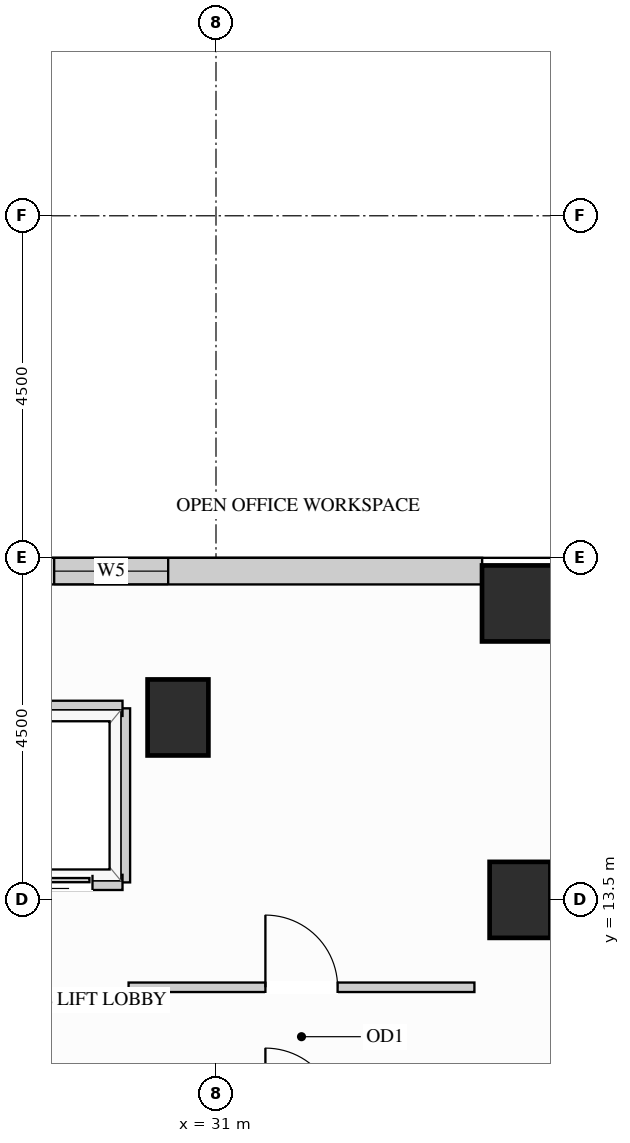
"""IFC4 building model, lengths in metres.
Left out: names, types, materials, properties, quantities, classifications, styles, units other than length and angle.
Written with IfcOpenShell. Run it as: python <this file> out.ifc"""

import sys

from ifc_helpers import new_model, si_unit, direction, frame, frame_2d, origin, origin_2d, place, context, subcontext, project, spatial, rectangle, extrude, source, transform, mapped, element, fill, save


model = new_model("IFC4")
c1 = context("Model", 3, precision=1e-05, world=origin(), true_north=direction((0.0, 1.0)))
c2 = subcontext(c1, "Body", "Model", "MODEL_VIEW")
j1 = project(units=[si_unit("LENGTHUNIT", "METRE"), si_unit("PLANEANGLEUNIT", "RADIAN")], contexts=[c1])
p1 = place(None, origin())
s1 = spatial("IfcSite", under=j1, at=p1, CompositionType="ELEMENT")
p2 = place(p1, origin())
s2 = spatial("IfcBuilding", under=s1, at=p2, CompositionType="ELEMENT")
p3 = place(p2, frame((0.0, 0.0, 189.9)))
s3 = spatial("IfcBuildingStorey", under=s2, at=p3, CompositionType="ELEMENT", Elevation=189.9)
m1 = source(origin(), c2, "Body", "SweptSolid", [
    extrude(rectangle(XDim=0.8, YDim=1.0, at=origin_2d()), origin(), (0.0, 0.0, 1.0), 3.4),
])
for number, where, z_axis, x_axis in (
    (1, (35.0, 13.5, 0.0), (0.0, 0.0, 1.0), (1.0, 0.0, 0.0)),
    (2, (30.5, 15.9, 0.0), (0.0, 0.0, 1.0), (1.0, 0.0, 0.0)),
):
    element("IfcColumn", number, at=place(p3, frame(where, z_axis=z_axis, x_axis=x_axis)), inside=s3, PredefinedType="COLUMN", context=c2, shape_type="MappedRepresentation", body=[
        mapped(m1, transform((0.0, 0.0, 0.0), x_axis=(1.0, 0.0, 0.0), y_axis=(0.0, 1.0, 0.0), z_axis=(0.0, 0.0, 1.0))),
    ])
m2 = source(origin(), c2, "Body", "SweptSolid", [
    extrude(rectangle(XDim=1.0, YDim=1.0, at=origin_2d()), origin(), (0.0, 0.0, 1.0), 3.4),
])
p4 = place(p3, frame((35.0, 17.4, 0.0), z_axis=(0.0, 0.0, 1.0), x_axis=(1.0, 0.0, 0.0)))
e3 = element("IfcColumn", 3, at=p4, inside=s3, PredefinedType="COLUMN", context=c2, shape_type="MappedRepresentation", body=[
    mapped(m2, transform((0.0, 0.0, 0.0), x_axis=(1.0, 0.0, 0.0), y_axis=(0.0, 1.0, 0.0), z_axis=(0.0, 0.0, 1.0))),
])
p5 = place(p3, frame((34.502, 17.825, 0.0), z_axis=(0.0, 0.0, 1.0), x_axis=(-1.0, 0.0, 0.0)))
e4 = element("IfcWall", 4, at=p5, inside=s3, PredefinedType="SOLIDWALL", context=c2, shape_type="SweptSolid", body=[
    extrude(rectangle(XDim=15.104, YDim=0.35, at=frame_2d((7.552, 0.0))), origin(), (0.0, 0.0, 1.0), 3.385),
])
p6 = place(p5, frame((4.131, 0.0, 0.78)))
e5 = element("IfcOpeningElement", 5, at=p6, cuts=e4, PredefinedType="OPENING", context=c2, shape_type="SweptSolid", body=[
    extrude(rectangle(XDim=1.5, YDim=2.0, at=frame_2d((0.75, 1.0))), frame((0.0, 0.185, 0.0), z_axis=(0.0, -1.0, 0.0), x_axis=(1.0, 0.0, 0.0)), (0.0, 0.0, 1.0), 0.37),
])
p7 = place(p5, frame((9.442, 0.0, 0.78)))
e6 = element("IfcOpeningElement", 6, at=p7, cuts=e4, PredefinedType="OPENING", context=c2, shape_type="SweptSolid", body=[
    extrude(rectangle(XDim=1.5, YDim=2.0, at=frame_2d((0.75, 1.0))), frame((0.0, 0.185, 0.0), z_axis=(0.0, -1.0, 0.0), x_axis=(1.0, 0.0, 0.0)), (0.0, 0.0, 1.0), 0.37),
])
p8 = place(p3, frame((29.85, 12.35, 0.0), z_axis=(0.0, 0.0, 1.0), x_axis=(1.0, 0.0, 0.0)))
e7 = element("IfcWall", 7, at=p8, inside=s3, PredefinedType="PARTITIONING", context=c2, shape_type="SweptSolid", body=[
    extrude(rectangle(XDim=4.55, YDim=0.125, at=frame_2d((2.275, 0.0))), origin(), (0.0, 0.0, 1.0), 3.385),
])
p9 = place(p8, frame((1.8, 0.0, 0.0)))
e8 = element("IfcOpeningElement", 8, at=p9, cuts=e7, PredefinedType="OPENING", context=c2, shape_type="SweptSolid", body=[
    extrude(rectangle(XDim=0.95, YDim=2.15, at=frame_2d((0.475, 1.075))), frame((0.0, 0.073, 0.0), z_axis=(0.0, -1.0, 0.0), x_axis=(1.0, 0.0, 0.0)), (0.0, 0.0, 1.0), 0.145),
])
m3 = source(origin(), c2, "Body", "SweptSolid", [
    extrude(rectangle(XDim=2.29, YDim=0.2, at=frame_2d((1.145, 0.0))), origin(), (0.0, 0.0, 1.0), 3.385),
])
p10 = place(p3, frame((29.77, 13.73, 0.0), z_axis=(0.0, 0.0, 1.0), x_axis=(0.0, 1.0, 0.0)))
e9 = element("IfcWall", 9, at=p10, inside=s3, PredefinedType="PARTITIONING", context=c2, shape_type="MappedRepresentation", body=[
    mapped(m3, transform((0.0, 0.0, 0.0), x_axis=(1.0, 0.0, 0.0), y_axis=(0.0, 1.0, 0.0), z_axis=(0.0, 0.0, 1.0))),
])
m4 = source(origin(), c2, "Body", "SweptSolid", [
    extrude(rectangle(XDim=1.89, YDim=0.2, at=frame_2d((0.945, 0.0))), origin(), (0.0, 0.0, 1.0), 2.773),
])
p11 = place(p3, frame((27.88, 16.02, 0.0), z_axis=(0.0, 0.0, 1.0), x_axis=(1.0, 0.0, 0.0)))
e10 = element("IfcWall", 10, at=p11, inside=s3, PredefinedType="PARTITIONING", context=c2, shape_type="MappedRepresentation", body=[
    mapped(m4, transform((0.0, 0.0, 0.0), x_axis=(1.0, 0.0, 0.0), y_axis=(0.0, 1.0, 0.0), z_axis=(0.0, 0.0, 1.0))),
])
p12 = place(p3, frame((27.88, 13.73, 0.0), z_axis=(0.0, 0.0, 1.0), x_axis=(1.0, 0.0, 0.0)))
e11 = element("IfcWall", 11, at=p12, inside=s3, PredefinedType="PARTITIONING", context=c2, shape_type="SweptSolid", body=[
    extrude(rectangle(XDim=1.89, YDim=0.2, at=frame_2d((0.945, 0.0))), origin(), (0.0, 0.0, 1.0), 2.466),
])
p13 = place(p12, frame((0.395, 0.0, 0.0)))
e12 = element("IfcOpeningElement", 12, at=p13, cuts=e11, PredefinedType="OPENING", context=c2, shape_type="SweptSolid", body=[
    extrude(rectangle(XDim=1.1, YDim=2.2, at=frame_2d((0.55, 1.1))), frame((0.0, 0.11, 0.0), z_axis=(0.0, -1.0, 0.0), x_axis=(1.0, 0.0, 0.0)), (0.0, 0.0, 1.0), 0.22),
])
m5 = source(origin(), c2, "Body", "SweptSolid", [
    extrude(rectangle(XDim=1.1, YDim=2.2, at=frame_2d((0.55, 1.1))), frame((0.0, 0.025, 0.0), z_axis=(0.0, -1.0, 0.0), x_axis=(1.0, 0.0, 0.0)), (0.0, 0.0, 1.0), 0.05),
])
p14 = place(p13, origin())
e13 = element("IfcDoor", 13, at=p14, inside=s3, OperationType="SLIDING_TO_LEFT", PredefinedType="DOOR", context=c2, shape_type="MappedRepresentation", body=[
    mapped(m5, transform((0.0, 0.0, 0.0), x_axis=(1.0, 0.0, 0.0), y_axis=(0.0, 1.0, 0.0), z_axis=(0.0, 0.0, 1.0))),
])
fill(e12, e13)
m6 = source(origin(), c2, "Body", "SweptSolid", [
    extrude(rectangle(XDim=0.95, YDim=2.15, at=frame_2d((0.475, 1.075))), frame((0.0, 0.025, 0.0), z_axis=(0.0, -1.0, 0.0), x_axis=(1.0, 0.0, 0.0)), (0.0, 0.0, 1.0), 0.05),
])
p15 = place(p9, origin())
e14 = element("IfcDoor", 14, at=p15, inside=s3, OperationType="SINGLE_SWING_LEFT", PredefinedType="DOOR", context=c2, shape_type="MappedRepresentation", body=[
    mapped(m6, transform((0.0, 0.0, 0.0), x_axis=(1.0, 0.0, 0.0), y_axis=(0.0, 1.0, 0.0), z_axis=(0.0, 0.0, 1.0))),
])
fill(e8, e14)
m7 = source(origin(), c2, "Body", "SweptSolid", [
    extrude(rectangle(XDim=1.5, YDim=2.0, at=frame_2d((0.75, 1.0))), frame((0.0, 0.03, 0.0), z_axis=(0.0, -1.0, 0.0), x_axis=(1.0, 0.0, 0.0)), (0.0, 0.0, 1.0), 0.06),
])
p16 = place(p6, origin())
e15 = element("IfcWindow", 15, at=p16, inside=s3, PartitioningType="SINGLE_PANEL", PredefinedType="WINDOW", context=c2, shape_type="MappedRepresentation", body=[
    mapped(m7, transform((0.0, 0.0, 0.0), x_axis=(1.0, 0.0, 0.0), y_axis=(0.0, 1.0, 0.0), z_axis=(0.0, 0.0, 1.0))),
])
fill(e5, e15)
save(model, sys.argv[1])
